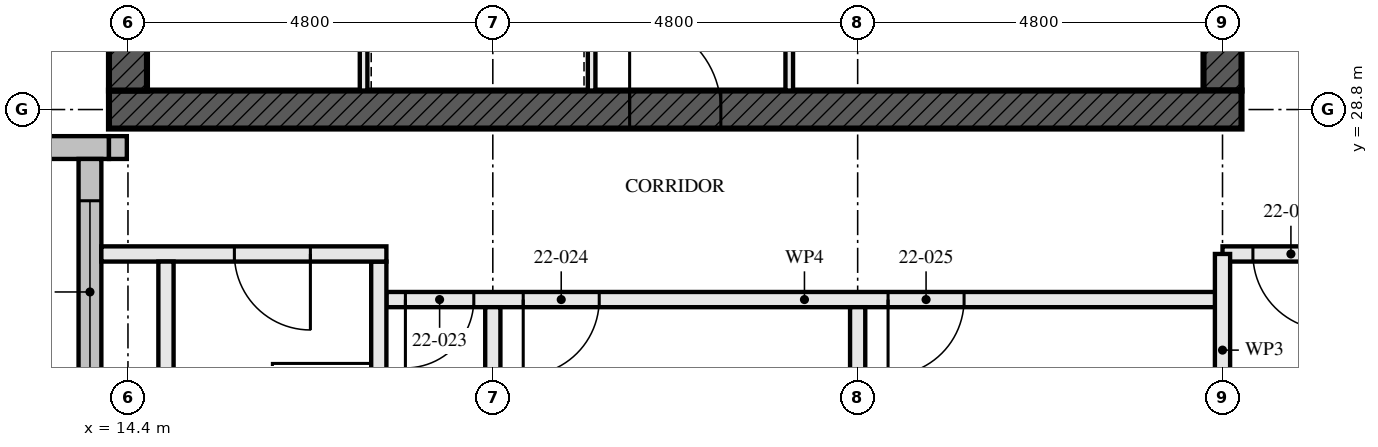
"""IFC4 building model, lengths in metres.
Left out: names, types, materials, properties, quantities, classifications, styles, units other than length and angle.
Written with IfcOpenShell. Run it as: python <this file> out.ifc"""

import sys

from ifc_helpers import new_model, si_unit, direction, frame, frame_2d, origin, place, context, subcontext, project, spatial, rectangle, extrude, element, fill, save


model = new_model("IFC4")
c1 = context("Model", 3, precision=1e-05, world=origin(), true_north=direction((0.0, 1.0)))
c2 = subcontext(c1, "Body", "Model", "MODEL_VIEW")
j1 = project(units=[si_unit("LENGTHUNIT", "METRE"), si_unit("PLANEANGLEUNIT", "RADIAN")], contexts=[c1])
p1 = place(None, origin())
s1 = spatial("IfcSite", under=j1, at=p1, CompositionType="ELEMENT")
p2 = place(p1, origin())
s2 = spatial("IfcBuilding", under=s1, at=p2, CompositionType="ELEMENT")
p3 = place(p2, frame((0.0, 0.0, 84.0)))
s3 = spatial("IfcBuildingStorey", under=s2, at=p3, CompositionType="ELEMENT", Elevation=84.0)
p4 = place(p3, frame((14.15, 28.8, -0.17), z_axis=(0.0, 0.0, 1.0), x_axis=(1.0, 0.0, 0.0)))
e1 = element("IfcWall", 1, at=p4, inside=s3, PredefinedType="SHEAR", context=c2, shape_type="SweptSolid", body=[
    extrude(rectangle(XDim=14.9, YDim=0.5, at=frame_2d((7.45, 0.0))), origin(), (0.0, 0.0, 1.0), 3.5),
])
p5 = place(p4, frame((6.85, 0.0, 0.17)))
e2 = element("IfcOpeningElement", 2, at=p5, cuts=e1, PredefinedType="OPENING", context=c2, shape_type="SweptSolid", body=[
    extrude(rectangle(XDim=1.2, YDim=2.1, at=frame_2d((0.6, 1.05))), frame((0.0, 0.26, 0.0), z_axis=(0.0, -1.0, 0.0), x_axis=(1.0, 0.0, 0.0)), (0.0, 0.0, 1.0), 0.521),
])
p6 = place(p3, frame((14.4, 42.95, -0.17), z_axis=(0.0, 0.0, 1.0), x_axis=(0.0, -1.0, 0.0)))
e3 = element("IfcWall", 3, at=p6, inside=s3, PredefinedType="SHEAR", context=c2, shape_type="SweptSolid", body=[
    extrude(rectangle(XDim=13.9, YDim=0.5, at=frame_2d((6.95, 0.0))), origin(), (0.0, 0.0, 1.0), 3.5),
])
p7 = place(p6, frame((6.35, 0.0, 0.17)))
e4 = element("IfcOpeningElement", 4, at=p7, cuts=e3, PredefinedType="OPENING", context=c2, shape_type="SweptSolid", body=[
    extrude(rectangle(XDim=1.2, YDim=2.1, at=frame_2d((0.6, 1.05))), frame((0.0, 0.26, 0.0), z_axis=(0.0, -1.0, 0.0), x_axis=(1.0, 0.0, 0.0)), (0.0, 0.0, 1.0), 0.521),
])
p8 = place(p3, frame((28.8, 29.05, -0.17), z_axis=(0.0, 0.0, 1.0), x_axis=(0.0, 1.0, 0.0)))
e5 = element("IfcWall", 5, at=p8, inside=s3, PredefinedType="SHEAR", context=c2, shape_type="SweptSolid", body=[
    extrude(rectangle(XDim=13.9, YDim=0.5, at=frame_2d((6.95, 0.0))), origin(), (0.0, 0.0, 1.0), 3.5),
])
p9 = place(p8, frame((6.35, 0.0, 0.17)))
e6 = element("IfcOpeningElement", 6, at=p9, cuts=e5, PredefinedType="OPENING", context=c2, shape_type="SweptSolid", body=[
    extrude(rectangle(XDim=1.2, YDim=2.1, at=frame_2d((0.6, 1.05))), frame((0.0, 0.26, 0.0), z_axis=(0.0, -1.0, 0.0), x_axis=(1.0, 0.0, 0.0)), (0.0, 0.0, 1.0), 0.521),
])
p10 = place(p3, frame((4.45, 28.3, 0.0), z_axis=(0.0, 0.0, 1.0), x_axis=(1.0, 0.0, 0.0)))
e7 = element("IfcWall", 7, at=p10, inside=s3, PredefinedType="SOLIDWALL", context=c2, shape_type="SweptSolid", body=[
    extrude(rectangle(XDim=9.7, YDim=0.3, at=frame_2d((4.85, 0.0))), origin(), (0.0, 0.0, 1.0), 3.5),
])
p11 = place(p10, frame((2.25, 0.0, 0.0)))
e8 = element("IfcOpeningElement", 8, at=p11, cuts=e7, PredefinedType="OPENING", context=c2, shape_type="SweptSolid", body=[
    extrude(rectangle(XDim=1.0, YDim=2.4, at=frame_2d((0.5, 1.2))), frame((0.0, 0.161, 0.0), z_axis=(0.0, -1.0, 0.0), x_axis=(1.0, 0.0, 0.0)), (0.0, 0.0, 1.0), 0.321),
])
p12 = place(p10, frame((6.35, 0.0, 0.6)))
e9 = element("IfcOpeningElement", 9, at=p12, cuts=e7, PredefinedType="OPENING", context=c2, shape_type="SweptSolid", body=[
    extrude(rectangle(XDim=2.4, YDim=1.8, at=frame_2d((1.2, 0.9))), frame((0.0, 0.161, 0.0), z_axis=(0.0, -1.0, 0.0), x_axis=(1.0, 0.0, 0.0)), (0.0, 0.0, 1.0), 0.321),
])
p13 = place(p3, frame((13.9, 28.15, 0.0), z_axis=(0.0, 0.0, 1.0), x_axis=(0.0, -1.0, 0.0)))
e10 = element("IfcWall", 10, at=p13, inside=s3, PredefinedType="SOLIDWALL", context=c2, shape_type="SweptSolid", body=[
    extrude(rectangle(XDim=9.6, YDim=0.3, at=frame_2d((4.8, 0.0))), origin(), (0.0, 0.0, 1.0), 3.5),
])
p14 = place(p13, frame((6.05, 0.0, 0.0)))
e11 = element("IfcOpeningElement", 11, at=p14, cuts=e10, PredefinedType="OPENING", context=c2, shape_type="SweptSolid", body=[
    extrude(rectangle(XDim=1.0, YDim=2.4, at=frame_2d((0.5, 1.2))), frame((0.0, 0.161, 0.0), z_axis=(0.0, -1.0, 0.0), x_axis=(1.0, 0.0, 0.0)), (0.0, 0.0, 1.0), 0.321),
])
p15 = place(p13, frame((0.55, 0.0, 0.6)))
e12 = element("IfcOpeningElement", 12, at=p15, cuts=e10, PredefinedType="OPENING", context=c2, shape_type="SweptSolid", body=[
    extrude(rectangle(XDim=2.4, YDim=1.8, at=frame_2d((1.2, 0.9))), frame((0.0, 0.161, 0.0), z_axis=(0.0, -1.0, 0.0), x_axis=(1.0, 0.0, 0.0)), (0.0, 0.0, 1.0), 0.321),
])
p16 = place(p3, frame((14.15, 28.3, 2.39), z_axis=(0.0, 0.0, 1.0), x_axis=(1.0, 0.0, 0.0)))
e13 = element("IfcWall", 13, at=p16, inside=s3, PredefinedType="SOLIDWALL", context=c2, shape_type="SweptSolid", body=[
    extrude(rectangle(XDim=0.235, YDim=0.3, at=frame_2d((0.118, 0.0))), origin(), (0.0, 0.0, 1.0), 0.88),
])
for number, where, z_axis, x_axis in (
    (14, (14.9, 22.1, 0.0), (0.0, 0.0, 1.0), (0.0, 1.0, 0.0)),
    (15, (17.7, 22.1, 0.0), (0.0, 0.0, 1.0), (0.0, 1.0, 0.0)),
):
    element("IfcWall", number, at=place(p3, frame(where, z_axis=z_axis, x_axis=x_axis)), inside=s3, PredefinedType="SOLIDWALL", context=c2, shape_type="SweptSolid", body=[
        extrude(rectangle(XDim=4.7, YDim=0.2, at=frame_2d((2.35, 0.0))), origin(), (0.0, 0.0, 1.0), 2.99),
    ])
p17 = place(p3, frame((14.05, 26.9, 0.0), z_axis=(0.0, 0.0, 1.0), x_axis=(1.0, 0.0, 0.0)))
e16 = element("IfcWall", 16, at=p17, inside=s3, PredefinedType="SOLIDWALL", context=c2, shape_type="SweptSolid", body=[
    extrude(rectangle(XDim=3.75, YDim=0.2, at=frame_2d((1.875, 0.0))), origin(), (0.0, 0.0, 1.0), 2.32),
])
p18 = place(p17, frame((1.75, 0.0, 0.0)))
e17 = element("IfcOpeningElement", 17, at=p18, cuts=e16, PredefinedType="OPENING", context=c2, shape_type="SweptSolid", body=[
    extrude(rectangle(XDim=1.0, YDim=2.1, at=frame_2d((0.5, 1.05))), frame((0.0, 0.111, 0.0), z_axis=(0.0, -1.0, 0.0), x_axis=(1.0, 0.0, 0.0)), (0.0, 0.0, 1.0), 0.221),
])
p19 = place(p3, frame((19.2, 19.545, 0.0), z_axis=(0.0, 0.0, 1.0), x_axis=(0.0, 1.0, 0.0)))
e18 = element("IfcWall", 18, at=p19, inside=s3, PredefinedType="PARTITIONING", context=c2, shape_type="SweptSolid", body=[
    extrude(rectangle(XDim=6.655, YDim=0.2, at=frame_2d((3.328, 0.0))), origin(), (0.0, 0.0, 1.0), 2.55),
])
p20 = place(p3, frame((24.0, 14.745, 0.0), z_axis=(0.0, 0.0, 1.0), x_axis=(0.0, 1.0, 0.0)))
e19 = element("IfcWall", 19, at=p20, inside=s3, PredefinedType="PARTITIONING", context=c2, shape_type="SweptSolid", body=[
    extrude(rectangle(XDim=11.455, YDim=0.2, at=frame_2d((5.728, 0.0))), origin(), (0.0, 0.0, 1.0), 2.55),
])
p21 = place(p3, frame((17.8, 26.3, 0.0), z_axis=(0.0, 0.0, 1.0), x_axis=(1.0, 0.0, 0.0)))
e20 = element("IfcWall", 20, at=p21, inside=s3, PredefinedType="PARTITIONING", context=c2, shape_type="SweptSolid", body=[
    extrude(rectangle(XDim=11.0, YDim=0.2, at=frame_2d((5.5, 0.0))), origin(), (0.0, 0.0, 1.0), 2.55),
])
p22 = place(p21, frame((0.25, 0.0, 0.0)))
e21 = element("IfcOpeningElement", 21, at=p22, cuts=e20, PredefinedType="OPENING", context=c2, shape_type="SweptSolid", body=[
    extrude(rectangle(XDim=0.9, YDim=2.1, at=frame_2d((0.45, 1.05))), frame((0.0, 0.111, 0.0), z_axis=(0.0, -1.0, 0.0), x_axis=(1.0, 0.0, 0.0)), (0.0, 0.0, 1.0), 0.221),
])
p23 = place(p21, frame((1.8, 0.0, 0.0)))
e22 = element("IfcOpeningElement", 22, at=p23, cuts=e20, PredefinedType="OPENING", context=c2, shape_type="SweptSolid", body=[
    extrude(rectangle(XDim=1.0, YDim=2.1, at=frame_2d((0.5, 1.05))), frame((0.0, 0.111, 0.0), z_axis=(0.0, -1.0, 0.0), x_axis=(1.0, 0.0, 0.0)), (0.0, 0.0, 1.0), 0.221),
])
p24 = place(p21, frame((6.6, 0.0, 0.0)))
e23 = element("IfcOpeningElement", 23, at=p24, cuts=e20, PredefinedType="OPENING", context=c2, shape_type="SweptSolid", body=[
    extrude(rectangle(XDim=1.0, YDim=2.1, at=frame_2d((0.5, 1.05))), frame((0.0, 0.111, 0.0), z_axis=(0.0, -1.0, 0.0), x_axis=(1.0, 0.0, 0.0)), (0.0, 0.0, 1.0), 0.221),
])
p25 = place(p3, frame((28.8, 26.9, 0.0), z_axis=(0.0, 0.0, 1.0), x_axis=(1.0, 0.0, 0.0)))
e24 = element("IfcWall", 24, at=p25, inside=s3, PredefinedType="PARTITIONING", context=c2, shape_type="SweptSolid", body=[
    extrude(rectangle(XDim=9.6, YDim=0.2, at=frame_2d((4.8, 0.0))), origin(), (0.0, 0.0, 1.0), 3.33),
])
p26 = place(p25, frame((0.4, 0.0, 0.0)))
e25 = element("IfcOpeningElement", 25, at=p26, cuts=e24, PredefinedType="OPENING", context=c2, shape_type="SweptSolid", body=[
    extrude(rectangle(XDim=1.0, YDim=2.1, at=frame_2d((0.5, 1.05))), frame((0.0, 0.111, 0.0), z_axis=(0.0, -1.0, 0.0), x_axis=(1.0, 0.0, 0.0)), (0.0, 0.0, 1.0), 0.221),
])
p27 = place(p25, frame((5.2, 0.0, 0.0)))
e26 = element("IfcOpeningElement", 26, at=p27, cuts=e24, PredefinedType="OPENING", context=c2, shape_type="SweptSolid", body=[
    extrude(rectangle(XDim=1.0, YDim=2.1, at=frame_2d((0.5, 1.05))), frame((0.0, 0.111, 0.0), z_axis=(0.0, -1.0, 0.0), x_axis=(1.0, 0.0, 0.0)), (0.0, 0.0, 1.0), 0.221),
])
p28 = place(p3, frame((20.5, 29.05, 0.0), z_axis=(0.0, 0.0, 1.0), x_axis=(0.0, 1.0, 0.0)))
e27 = element("IfcWall", 27, at=p28, inside=s3, PredefinedType="SOLIDWALL", context=c2, shape_type="SweptSolid", body=[
    extrude(rectangle(XDim=5.8, YDim=0.1, at=frame_2d((2.9, 0.0))), origin(), (0.0, 0.0, 1.0), 3.33),
])
p29 = place(p28, frame((0.8, 0.0, 0.0)))
e28 = element("IfcOpeningElement", 28, at=p29, cuts=e27, PredefinedType="OPENING", context=c2, shape_type="SweptSolid", body=[
    extrude(rectangle(XDim=1.1, YDim=2.3, at=frame_2d((0.55, 1.15))), frame((0.0, 0.061, 0.0), z_axis=(0.0, -1.0, 0.0), x_axis=(1.0, 0.0, 0.0)), (0.0, 0.0, 1.0), 0.121),
])
p30 = place(p28, frame((3.775, 0.0, 0.0)))
e29 = element("IfcOpeningElement", 29, at=p30, cuts=e27, PredefinedType="OPENING", context=c2, shape_type="SweptSolid", body=[
    extrude(rectangle(XDim=1.1, YDim=2.3, at=frame_2d((0.55, 1.15))), frame((0.0, 0.061, 0.0), z_axis=(0.0, -1.0, 0.0), x_axis=(1.0, 0.0, 0.0)), (0.0, 0.0, 1.0), 0.121),
])
p31 = place(p3, frame((23.1, 29.05, 0.0), z_axis=(0.0, 0.0, 1.0), x_axis=(0.0, 1.0, 0.0)))
e30 = element("IfcWall", 30, at=p31, inside=s3, PredefinedType="SOLIDWALL", context=c2, shape_type="SweptSolid", body=[
    extrude(rectangle(XDim=5.8, YDim=0.1, at=frame_2d((2.9, 0.0))), origin(), (0.0, 0.0, 1.0), 3.33),
])
p32 = place(p31, frame((1.0, 0.0, 0.0)))
e31 = element("IfcOpeningElement", 31, at=p32, cuts=e30, PredefinedType="OPENING", context=c2, shape_type="SweptSolid", body=[
    extrude(rectangle(XDim=0.7, YDim=2.1, at=frame_2d((0.35, 1.05))), frame((0.0, 0.061, 0.0), z_axis=(0.0, -1.0, 0.0), x_axis=(1.0, 0.0, 0.0)), (0.0, 0.0, 1.0), 0.121),
])
p33 = place(p3, frame((17.5, 29.05, 0.0), z_axis=(0.0, 0.0, 1.0), x_axis=(0.0, 1.0, 0.0)))
e32 = element("IfcWall", 32, at=p33, inside=s3, PredefinedType="SOLIDWALL", context=c2, shape_type="SweptSolid", body=[
    extrude(rectangle(XDim=5.8, YDim=0.1, at=frame_2d((2.9, 0.0))), origin(), (0.0, 0.0, 1.0), 3.33),
])
p34 = place(p3, frame((28.8, 24.37, 0.0), z_axis=(0.0, 0.0, 1.0), x_axis=(0.0, 1.0, 0.0)))
e33 = element("IfcWall", 33, at=p34, inside=s3, PredefinedType="PARTITIONING", context=c2, shape_type="SweptSolid", body=[
    extrude(rectangle(XDim=2.53, YDim=0.2, at=frame_2d((1.265, 0.0))), origin(), (0.0, 0.0, 1.0), 2.32),
])
p35 = place(p15, origin())
e34 = element("IfcWindow", 34, at=p35, inside=s3, PartitioningType="SINGLE_PANEL", PredefinedType="WINDOW", context=c2, shape_type="SweptSolid", body=[
    extrude(rectangle(XDim=2.4, YDim=1.8, at=frame_2d((1.2, 0.9))), frame((0.0, 0.03, 0.0), z_axis=(0.0, -1.0, 0.0), x_axis=(1.0, 0.0, 0.0)), (0.0, 0.0, 1.0), 0.06),
])
fill(e12, e34)
p36 = place(p18, frame((1.0, 0.0, 0.0), z_axis=(0.0, 0.0, 1.0), x_axis=(-1.0, 0.0, 0.0)))
e35 = element("IfcDoor", 35, at=p36, inside=s3, OperationType="SINGLE_SWING_RIGHT", PredefinedType="DOOR", context=c2, shape_type="SweptSolid", body=[
    extrude(rectangle(XDim=1.0, YDim=2.1, at=frame_2d((0.5, 1.05))), frame((0.0, 0.032, 0.0), z_axis=(0.0, -1.0, 0.0), x_axis=(1.0, 0.0, 0.0)), (0.0, 0.0, 1.0), 0.064),
])
fill(e17, e35)
p37 = place(p22, frame((0.9, 0.0, 0.0), z_axis=(0.0, 0.0, 1.0), x_axis=(-1.0, 0.0, 0.0)))
e36 = element("IfcDoor", 36, at=p37, inside=s3, OperationType="SINGLE_SWING_LEFT", PredefinedType="DOOR", context=c2, shape_type="SweptSolid", body=[
    extrude(rectangle(XDim=0.9, YDim=2.1, at=frame_2d((0.45, 1.05))), frame((0.0, 0.027, 0.0), z_axis=(0.0, -1.0, 0.0), x_axis=(1.0, 0.0, 0.0)), (0.0, 0.0, 1.0), 0.054),
])
fill(e21, e36)
p38 = place(p23, frame((1.0, 0.0, 0.0), z_axis=(0.0, 0.0, 1.0), x_axis=(-1.0, 0.0, 0.0)))
e37 = element("IfcDoor", 37, at=p38, inside=s3, OperationType="SINGLE_SWING_LEFT", PredefinedType="DOOR", context=c2, shape_type="SweptSolid", body=[
    extrude(rectangle(XDim=1.0, YDim=2.1, at=frame_2d((0.5, 1.05))), frame((0.0, 0.027, 0.0), z_axis=(0.0, -1.0, 0.0), x_axis=(1.0, 0.0, 0.0)), (0.0, 0.0, 1.0), 0.054),
])
fill(e22, e37)
p39 = place(p24, frame((1.0, 0.0, 0.0), z_axis=(0.0, 0.0, 1.0), x_axis=(-1.0, 0.0, 0.0)))
e38 = element("IfcDoor", 38, at=p39, inside=s3, OperationType="SINGLE_SWING_LEFT", PredefinedType="DOOR", context=c2, shape_type="SweptSolid", body=[
    extrude(rectangle(XDim=1.0, YDim=2.1, at=frame_2d((0.5, 1.05))), frame((0.0, 0.027, 0.0), z_axis=(0.0, -1.0, 0.0), x_axis=(1.0, 0.0, 0.0)), (0.0, 0.0, 1.0), 0.054),
])
fill(e23, e38)
p40 = place(p26, frame((1.0, 0.0, 0.0), z_axis=(0.0, 0.0, 1.0), x_axis=(-1.0, 0.0, 0.0)))
e39 = element("IfcDoor", 39, at=p40, inside=s3, OperationType="SINGLE_SWING_RIGHT", PredefinedType="DOOR", context=c2, shape_type="SweptSolid", body=[
    extrude(rectangle(XDim=1.0, YDim=2.1, at=frame_2d((0.5, 1.05))), frame((0.0, 0.027, 0.0), z_axis=(0.0, -1.0, 0.0), x_axis=(1.0, 0.0, 0.0)), (0.0, 0.0, 1.0), 0.054),
])
fill(e25, e39)
p41 = place(p5, origin())
e40 = element("IfcDoor", 40, at=p41, inside=s3, OperationType="SINGLE_SWING_LEFT", PredefinedType="DOOR", context=c2, shape_type="SweptSolid", body=[
    extrude(rectangle(XDim=1.2, YDim=2.1, at=frame_2d((0.6, 1.05))), frame((0.0, 0.027, 0.0), z_axis=(0.0, -1.0, 0.0), x_axis=(1.0, 0.0, 0.0)), (0.0, 0.0, 1.0), 0.054),
])
fill(e2, e40)
save(model, sys.argv[1])
